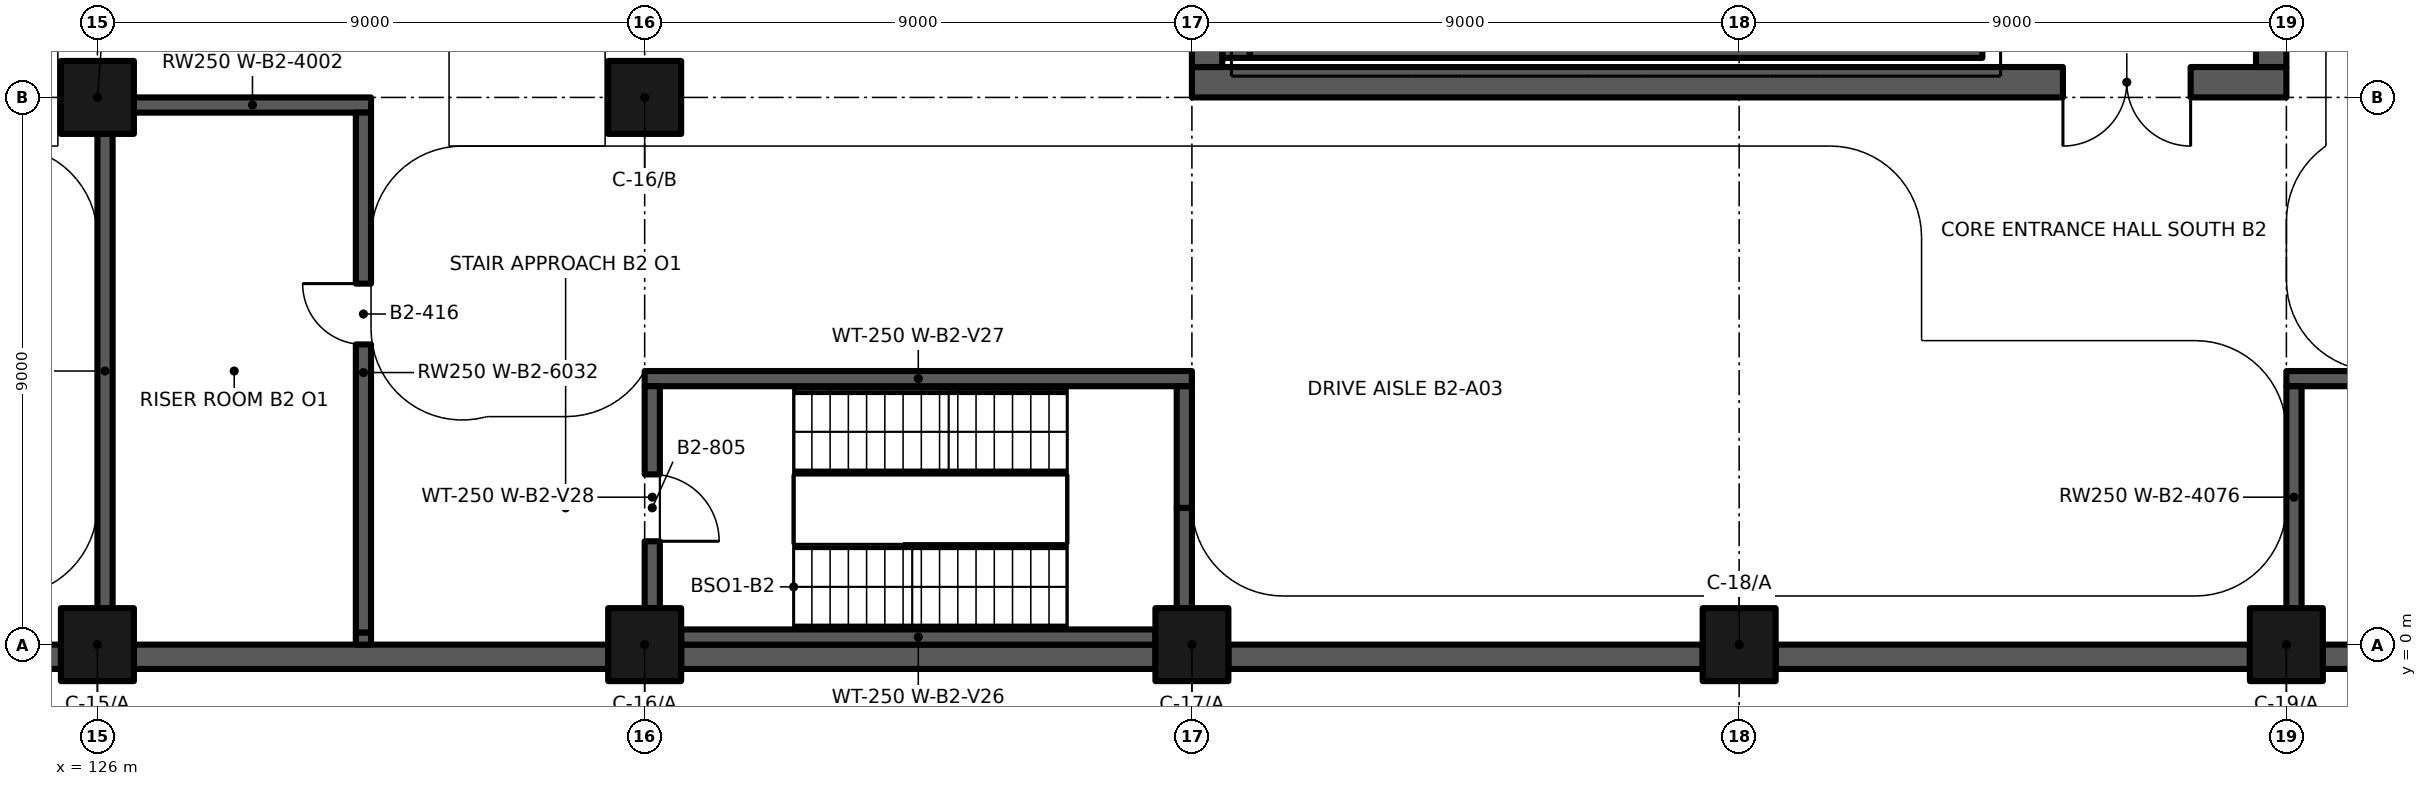
"""IFC4 building model, lengths in metres.
Left out: names, types, materials, properties, quantities, classifications, styles, units other than length and angle.
Written with IfcOpenShell. Run it as: python <this file> out.ifc"""

import sys

from ifc_helpers import new_model, si_unit, direction, frame, frame_2d, origin, origin_2d, place, context, subcontext, project, spatial, rectangle, extrude, element, fill, save


model = new_model("IFC4")
c1 = context("Model", 3, precision=1e-05, world=origin(), true_north=direction((0.0, 1.0)))
c2 = subcontext(c1, "Body", "Model", "MODEL_VIEW")
j1 = project(units=[si_unit("LENGTHUNIT", "METRE"), si_unit("PLANEANGLEUNIT", "RADIAN")], contexts=[c1])
p1 = place(None, origin())
s1 = spatial("IfcSite", under=j1, at=p1, CompositionType="ELEMENT")
p2 = place(p1, origin())
s2 = spatial("IfcBuilding", under=s1, at=p2, CompositionType="ELEMENT")
p3 = place(p2, frame((0.0, 0.0, -9.9)))
s3 = spatial("IfcBuildingStorey", under=s2, at=p3, CompositionType="ELEMENT", Elevation=-9.9)
p4 = place(p3, frame((117.45, -0.2, -0.5), z_axis=(0.0, 0.0, 1.0), x_axis=(1.0, 0.0, 0.0)))
e1 = element("IfcWall", 1, at=p4, inside=s3, PredefinedType="SOLIDWALL", context=c2, shape_type="SweptSolid", body=[
    extrude(rectangle(XDim=7.95, YDim=0.4, at=frame_2d((3.975, 0.0))), origin(), (0.0, 0.0, 1.0), 5.3),
])
for number, where, z_axis, x_axis in (
    (2, (126.6, -0.2, -0.5), (0.0, 0.0, 1.0), (1.0, 0.0, 0.0)),
    (3, (135.6, -0.2, -0.5), (0.0, 0.0, 1.0), (1.0, 0.0, 0.0)),
    (4, (144.6, -0.2, -0.5), (0.0, 0.0, 1.0), (1.0, 0.0, 0.0)),
    (5, (153.6, -0.2, -0.5), (0.0, 0.0, 1.0), (1.0, 0.0, 0.0)),
    (6, (162.6, -0.2, -0.5), (0.0, 0.0, 1.0), (1.0, 0.0, 0.0)),
):
    element("IfcWall", number, at=place(p3, frame(where, z_axis=z_axis, x_axis=x_axis)), inside=s3, PredefinedType="SOLIDWALL", context=c2, shape_type="SweptSolid", body=[
        extrude(rectangle(XDim=7.8, YDim=0.4, at=frame_2d((3.9, 0.0))), origin(), (0.0, 0.0, 1.0), 5.3),
    ])
for number, where, z_axis, x_axis in (
    (7, (126.0, 0.0, 0.0), (0.0, 0.0, 1.0), (1.0, 0.0, 0.0)),
    (8, (135.0, 0.0, 0.0), (0.0, 0.0, 1.0), (1.0, 0.0, 0.0)),
    (9, (144.0, 0.0, 0.0), (0.0, 0.0, 1.0), (1.0, 0.0, 0.0)),
    (10, (153.0, 0.0, 0.0), (0.0, 0.0, 1.0), (1.0, 0.0, 0.0)),
    (11, (162.0, 0.0, 0.0), (0.0, 0.0, 1.0), (1.0, 0.0, 0.0)),
    (12, (126.0, 9.0, 0.0), (0.0, 0.0, 1.0), (1.0, 0.0, 0.0)),
    (13, (135.0, 9.0, 0.0), (0.0, 0.0, 1.0), (1.0, 0.0, 0.0)),
):
    element("IfcColumn", number, at=place(p3, frame(where, z_axis=z_axis, x_axis=x_axis)), inside=s3, PredefinedType="COLUMN", context=c2, shape_type="SweptSolid", body=[
        extrude(rectangle(XDim=1.2, YDim=1.2, at=origin_2d()), origin(), (0.0, 0.0, 1.0), 4.8),
    ])
p5 = place(p3, frame((135.6, 0.125, 0.0), z_axis=(0.0, 0.0, 1.0), x_axis=(1.0, 0.0, 0.0)))
e14 = element("IfcWall", 14, at=p5, inside=s3, PredefinedType="SHEAR", context=c2, shape_type="SweptSolid", body=[
    extrude(rectangle(XDim=7.8, YDim=0.25, at=frame_2d((3.9, 0.0))), origin(), (0.0, 0.0, 1.0), 4.8),
])
p6 = place(p3, frame((135.0, 4.375, 0.0), z_axis=(0.0, 0.0, 1.0), x_axis=(1.0, 0.0, 0.0)))
e15 = element("IfcWall", 15, at=p6, inside=s3, PredefinedType="SHEAR", context=c2, shape_type="SweptSolid", body=[
    extrude(rectangle(XDim=9.0, YDim=0.25, at=frame_2d((4.5, 0.0))), origin(), (0.0, 0.0, 1.0), 4.8),
])
p7 = place(p3, frame((135.125, 0.6, 0.0), z_axis=(0.0, 0.0, 1.0), x_axis=(0.0, 1.0, 0.0)))
e16 = element("IfcWall", 16, at=p7, inside=s3, PredefinedType="SHEAR", context=c2, shape_type="SweptSolid", body=[
    extrude(rectangle(XDim=3.65, YDim=0.25, at=frame_2d((1.825, 0.0))), origin(), (0.0, 0.0, 1.0), 4.8),
])
p8 = place(p7, frame((2.2, 0.0, 0.0), z_axis=(0.0, 0.0, 1.0), x_axis=(-1.0, 0.0, 0.0)))
e17 = element("IfcOpeningElement", 17, at=p8, cuts=e16, PredefinedType="OPENING", context=c2, shape_type="SweptSolid", body=[
    extrude(rectangle(XDim=1.1, YDim=2.1, at=frame_2d((0.55, 1.05))), frame((0.0, 0.135, 0.0), z_axis=(0.0, -1.0, 0.0), x_axis=(1.0, 0.0, 0.0)), (0.0, 0.0, 1.0), 0.27),
])
p9 = place(p3, frame((143.875, 0.6, 0.0), z_axis=(0.0, 0.0, 1.0), x_axis=(0.0, 1.0, 0.0)))
e18 = element("IfcWall", 18, at=p9, inside=s3, PredefinedType="SHEAR", context=c2, shape_type="SweptSolid", body=[
    extrude(rectangle(XDim=1.65, YDim=0.25, at=frame_2d((0.825, 0.0))), origin(), (0.0, 0.0, 1.0), 4.8),
])
p10 = place(p3, frame((143.875, 2.25, 0.0), z_axis=(0.0, 0.0, 1.0), x_axis=(0.0, 1.0, 0.0)))
e19 = element("IfcWall", 19, at=p10, inside=s3, PredefinedType="SHEAR", context=c2, shape_type="SweptSolid", body=[
    extrude(rectangle(XDim=2.0, YDim=0.25, at=frame_2d((1.0, 0.0))), origin(), (0.0, 0.0, 1.0), 4.8),
])
p11 = place(p3, frame((144.95, 9.775, -1.6), z_axis=(0.0, 0.0, 1.0), x_axis=(1.0, 0.0, 0.0)))
e20 = element("IfcWall", 20, at=p11, inside=s3, PredefinedType="SHEAR", context=c2, shape_type="SweptSolid", body=[
    extrude(rectangle(XDim=12.05, YDim=0.25, at=frame_2d((6.025, 0.0))), origin(), (0.0, 0.0, 1.0), 6.4),
])
p12 = place(p3, frame((144.5, 9.775, 0.0), z_axis=(0.0, 0.0, 1.0), x_axis=(1.0, 0.0, 0.0)))
e21 = element("IfcWall", 21, at=p12, inside=s3, PredefinedType="SHEAR", context=c2, shape_type="SweptSolid", body=[
    extrude(rectangle(XDim=0.45, YDim=0.25, at=frame_2d((0.225, 0.0))), origin(), (0.0, 0.0, 1.0), 4.8),
])
p13 = place(p3, frame((162.0, 4.375, 0.0), z_axis=(0.0, 0.0, 1.0), x_axis=(1.0, 0.0, 0.0)))
e22 = element("IfcWall", 22, at=p13, inside=s3, PredefinedType="SOLIDWALL", context=c2, shape_type="SweptSolid", body=[
    extrude(rectangle(XDim=8.8, YDim=0.25, at=frame_2d((4.4, 0.0))), origin(), (0.0, 0.0, 1.0), 4.5),
])
p14 = place(p13, frame((5.062, 0.0, 0.0), z_axis=(0.0, 0.0, 1.0), x_axis=(-1.0, 0.0, 0.0)))
e23 = element("IfcOpeningElement", 23, at=p14, cuts=e22, PredefinedType="OPENING", context=c2, shape_type="SweptSolid", body=[
    extrude(rectangle(XDim=1.0, YDim=2.1, at=frame_2d((0.5, 1.05))), frame((0.0, 0.135, 0.0), z_axis=(0.0, -1.0, 0.0), x_axis=(1.0, 0.0, 0.0)), (0.0, 0.0, 1.0), 0.27),
])
p15 = place(p3, frame((126.6, 8.875, 0.0), z_axis=(0.0, 0.0, 1.0), x_axis=(1.0, 0.0, 0.0)))
e24 = element("IfcWall", 24, at=p15, inside=s3, PredefinedType="SOLIDWALL", context=c2, shape_type="SweptSolid", body=[
    extrude(rectangle(XDim=3.9, YDim=0.25, at=frame_2d((1.95, 0.0))), origin(), (0.0, 0.0, 1.0), 4.5),
])
p16 = place(p3, frame((144.0, 9.25, 0.0), z_axis=(0.0, 0.0, 1.0), x_axis=(1.0, 0.0, 0.0)))
e25 = element("IfcWall", 25, at=p16, inside=s3, PredefinedType="SHEAR", context=c2, shape_type="SweptSolid", body=[
    extrude(rectangle(XDim=18.0, YDim=0.5, at=frame_2d((9.0, 0.0))), origin(), (0.0, 0.0, 1.0), 4.5),
])
p17 = place(p16, frame((16.425, 0.0, 0.0), z_axis=(0.0, 0.0, 1.0), x_axis=(-1.0, 0.0, 0.0)))
e26 = element("IfcOpeningElement", 26, at=p17, cuts=e25, PredefinedType="OPENING", context=c2, shape_type="SweptSolid", body=[
    extrude(rectangle(XDim=2.1, YDim=2.4, at=frame_2d((1.05, 1.2))), frame((0.0, 0.26, 0.0), z_axis=(0.0, -1.0, 0.0), x_axis=(1.0, 0.0, 0.0)), (0.0, 0.0, 1.0), 0.52),
])
p18 = place(p3, frame((126.125, 0.6, 0.0), z_axis=(0.0, 0.0, 1.0), x_axis=(0.0, 1.0, 0.0)))
e27 = element("IfcWall", 27, at=p18, inside=s3, PredefinedType="SOLIDWALL", context=c2, shape_type="SweptSolid", body=[
    extrude(rectangle(XDim=7.8, YDim=0.25, at=frame_2d((3.9, 0.0))), origin(), (0.0, 0.0, 1.0), 4.5),
])
p19 = place(p3, frame((130.375, 0.0, 0.0), z_axis=(0.0, 0.0, 1.0), x_axis=(0.0, 1.0, 0.0)))
e28 = element("IfcWall", 28, at=p19, inside=s3, PredefinedType="SOLIDWALL", context=c2, shape_type="SweptSolid", body=[
    extrude(rectangle(XDim=0.2, YDim=0.25, at=frame_2d((0.1, 0.0))), origin(), (0.0, 0.0, 1.0), 4.0),
])
p20 = place(p3, frame((130.375, 0.2, 0.0), z_axis=(0.0, 0.0, 1.0), x_axis=(0.0, 1.0, 0.0)))
e29 = element("IfcWall", 29, at=p20, inside=s3, PredefinedType="SOLIDWALL", context=c2, shape_type="SweptSolid", body=[
    extrude(rectangle(XDim=8.55, YDim=0.25, at=frame_2d((4.275, 0.0))), origin(), (0.0, 0.0, 1.0), 4.5),
])
p21 = place(p20, frame((4.738, 0.0, 0.0)))
e30 = element("IfcOpeningElement", 30, at=p21, cuts=e29, PredefinedType="OPENING", context=c2, shape_type="SweptSolid", body=[
    extrude(rectangle(XDim=1.0, YDim=2.1, at=frame_2d((0.5, 1.05))), frame((0.0, 0.135, 0.0), z_axis=(0.0, -1.0, 0.0), x_axis=(1.0, 0.0, 0.0)), (0.0, 0.0, 1.0), 0.27),
])
p22 = place(p3, frame((144.25, 9.5, 0.0), z_axis=(0.0, 0.0, 1.0), x_axis=(0.0, 1.0, 0.0)))
e31 = element("IfcWall", 31, at=p22, inside=s3, PredefinedType="SHEAR", context=c2, shape_type="SweptSolid", body=[
    extrude(rectangle(XDim=17.5, YDim=0.5, at=frame_2d((8.75, 0.0))), origin(), (0.0, 0.0, 1.0), 4.5),
])
p23 = place(p22, frame((3.6, 0.0, 0.0)))
e32 = element("IfcOpeningElement", 32, at=p23, cuts=e31, PredefinedType="OPENING", context=c2, shape_type="SweptSolid", body=[
    extrude(rectangle(XDim=1.6, YDim=2.4, at=frame_2d((0.8, 1.2))), frame((0.0, 0.26, 0.0), z_axis=(0.0, -1.0, 0.0), x_axis=(1.0, 0.0, 0.0)), (0.0, 0.0, 1.0), 0.52),
])
p24 = place(p3, frame((161.75, 9.5, 0.0), z_axis=(0.0, 0.0, 1.0), x_axis=(0.0, 1.0, 0.0)))
e33 = element("IfcWall", 33, at=p24, inside=s3, PredefinedType="SHEAR", context=c2, shape_type="SweptSolid", body=[
    extrude(rectangle(XDim=17.5, YDim=0.5, at=frame_2d((8.75, 0.0))), origin(), (0.0, 0.0, 1.0), 4.5),
])
p25 = place(p24, frame((5.35, 0.0, 0.0)))
e34 = element("IfcOpeningElement", 34, at=p25, cuts=e33, PredefinedType="OPENING", context=c2, shape_type="SweptSolid", body=[
    extrude(rectangle(XDim=1.8, YDim=2.4, at=frame_2d((0.9, 1.2))), frame((0.0, 0.26, 0.0), z_axis=(0.0, -1.0, 0.0), x_axis=(1.0, 0.0, 0.0)), (0.0, 0.0, 1.0), 0.52),
])
p26 = place(p3, frame((162.125, 0.6, 0.0), z_axis=(0.0, 0.0, 1.0), x_axis=(0.0, 1.0, 0.0)))
e35 = element("IfcWall", 35, at=p26, inside=s3, PredefinedType="SOLIDWALL", context=c2, shape_type="SweptSolid", body=[
    extrude(rectangle(XDim=3.65, YDim=0.25, at=frame_2d((1.825, 0.0))), origin(), (0.0, 0.0, 1.0), 4.5),
])
p27 = place(p8, origin())
e36 = element("IfcDoor", 36, at=p27, inside=s3, OperationType="SINGLE_SWING_RIGHT", PredefinedType="DOOR", context=c2, shape_type="SweptSolid", body=[
    extrude(rectangle(XDim=1.1, YDim=2.1, at=frame_2d((0.55, 1.05))), frame((0.0, 0.025, 0.0), z_axis=(0.0, -1.0, 0.0), x_axis=(1.0, 0.0, 0.0)), (0.0, 0.0, 1.0), 0.05),
])
fill(e17, e36)
p28 = place(p17, origin())
e37 = element("IfcDoor", 37, at=p28, inside=s3, OperationType="DOUBLE_DOOR_SINGLE_SWING", PredefinedType="DOOR", context=c2, shape_type="SweptSolid", body=[
    extrude(rectangle(XDim=2.1, YDim=2.4, at=frame_2d((1.05, 1.2))), frame((0.0, 0.025, 0.0), z_axis=(0.0, -1.0, 0.0), x_axis=(1.0, 0.0, 0.0)), (0.0, 0.0, 1.0), 0.05),
])
fill(e26, e37)
p29 = place(p21, origin())
e38 = element("IfcDoor", 38, at=p29, inside=s3, OperationType="SINGLE_SWING_RIGHT", PredefinedType="DOOR", context=c2, shape_type="SweptSolid", body=[
    extrude(rectangle(XDim=1.0, YDim=2.1, at=frame_2d((0.5, 1.05))), frame((0.0, 0.025, 0.0), z_axis=(0.0, -1.0, 0.0), x_axis=(1.0, 0.0, 0.0)), (0.0, 0.0, 1.0), 0.05),
])
fill(e30, e38)
save(model, sys.argv[1])
